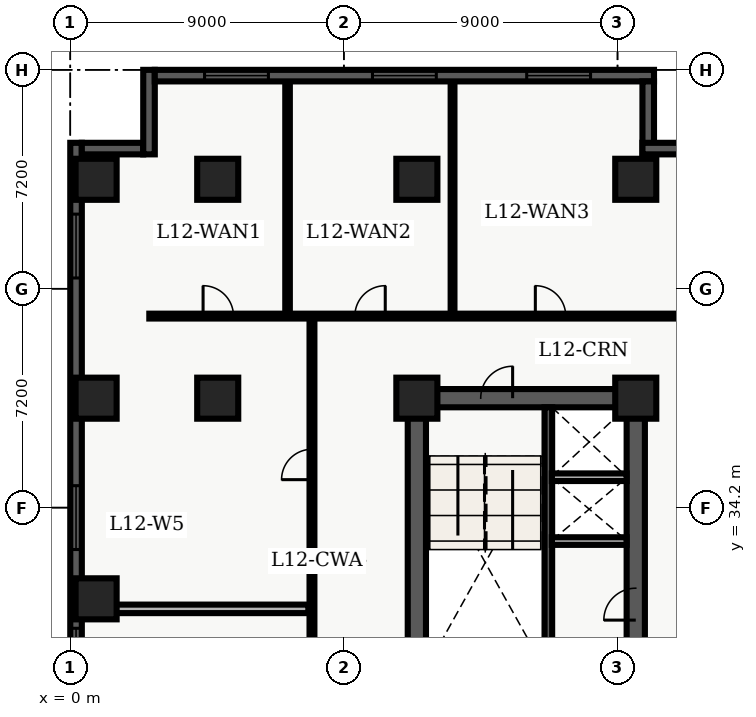
"""IFC4 building model, lengths in metres.
Left out: names, types, materials, properties, quantities, classifications, styles, units other than length and angle.
Written with IfcOpenShell. Run it as: python <this file> out.ifc"""

import sys

from ifc_helpers import new_model, entity, si_unit, converted_unit, direction, frame, origin_with_axes, origin_2d_with_axis, place, context, subcontext, project, spatial, polyline, rectangle, outline, extrude, element, fill, save


model = new_model("IFC4")
c1 = context("Model", 3, precision=1e-05, world=origin_with_axes(), true_north=direction((0.0, 1.0)))
c2 = subcontext(c1, "Body", "Model", "MODEL_VIEW")
j1 = project(units=[si_unit("LENGTHUNIT", "METRE"), converted_unit("PLANEANGLEUNIT", "DEGREE", entity("IfcPlaneAngleMeasure", 0.017), si_unit("PLANEANGLEUNIT", "RADIAN"), dimensions=[0, 0, 0, 0, 0, 0, 0])], contexts=[c1])
p1 = place(None, origin_with_axes())
s1 = spatial("IfcSite", under=j1, at=p1, CompositionType="ELEMENT")
p2 = place(p1, origin_with_axes())
s2 = spatial("IfcBuilding", under=s1, at=p2, CompositionType="ELEMENT")
p3 = place(p2, frame((0.0, 0.0, 52.2), z_axis=(0.0, 0.0, 1.0), x_axis=(1.0, 0.0, 0.0)))
s3 = spatial("IfcBuildingStorey", under=s2, at=p3, CompositionType="ELEMENT", Elevation=52.2)
p4 = place(p3, frame((11.4, 10.8, 0.0), z_axis=(0.0, 0.0, 1.0), x_axis=(0.0, 1.0, 0.0)))
e1 = element("IfcWall", 1, at=p4, inside=s3, PredefinedType="SHEAR", context=c2, shape_type="SweptSolid", body=[
    extrude(outline(polyline([(0.0, -0.3), (27.0, -0.3), (27.0, 0.3), (0.0, 0.3), (0.0, -0.3)])), origin_with_axes(), (0.0, 0.0, 1.0), 3.66),
])
p5 = place(p3, frame((11.4, 37.8, 0.0), z_axis=(0.0, 0.0, 1.0), x_axis=(1.0, 0.0, 0.0)))
e2 = element("IfcWall", 2, at=p5, inside=s3, PredefinedType="SHEAR", context=c2, shape_type="SweptSolid", body=[
    extrude(outline(polyline([(0.0, -0.3), (7.2, -0.3), (7.2, 0.3), (0.0, 0.3), (0.0, -0.3)])), origin_with_axes(), (0.0, 0.0, 1.0), 3.66),
])
p6 = place(p5, frame((2.625, 0.0, 0.0), z_axis=(0.0, 0.0, 1.0), x_axis=(1.0, 0.0, 0.0)))
e3 = element("IfcOpeningElement", 3, at=p6, cuts=e2, PredefinedType="OPENING", context=c2, shape_type="SweptSolid", body=[
    extrude(rectangle(XDim=1.05, YDim=0.62, at=origin_2d_with_axis()), origin_with_axes(), (0.0, 0.0, 1.0), 2.15),
])
p7 = place(p3, frame((18.6, 24.3, 0.0), z_axis=(0.0, 0.0, 1.0), x_axis=(0.0, 1.0, 0.0)))
e4 = element("IfcWall", 4, at=p7, inside=s3, PredefinedType="SHEAR", context=c2, shape_type="SweptSolid", body=[
    extrude(outline(polyline([(0.0, -0.3), (13.5, -0.3), (13.5, 0.3), (0.0, 0.3), (0.0, -0.3)])), origin_with_axes(), (0.0, 0.0, 1.0), 3.66),
])
p8 = place(p7, frame((6.725, 0.0, 0.0), z_axis=(0.0, 0.0, 1.0), x_axis=(1.0, 0.0, 0.0)))
e5 = element("IfcOpeningElement", 5, at=p8, cuts=e4, PredefinedType="OPENING", context=c2, shape_type="SweptSolid", body=[
    extrude(rectangle(XDim=1.05, YDim=0.62, at=origin_2d_with_axis()), origin_with_axes(), (0.0, 0.0, 1.0), 2.15),
])
p9 = place(p3, frame((15.725, 28.9, 0.0), z_axis=(0.0, 0.0, 1.0), x_axis=(0.0, 1.0, 0.0)))
e6 = element("IfcWall", 6, at=p9, inside=s3, PredefinedType="SHEAR", context=c2, shape_type="SweptSolid", body=[
    extrude(outline(polyline([(0.0, -0.125), (8.6, -0.125), (8.6, 0.125), (0.0, 0.125), (0.0, -0.125)])), origin_with_axes(), (0.0, 0.0, 1.0), 3.66),
])
for number, where, z_axis, x_axis in (
    (7, (11.4, 37.8, 0.0), (0.0, 0.0, 1.0), (1.0, 0.0, 0.0)),
    (8, (11.4, 45.0, 0.0), (0.0, 0.0, 1.0), (1.0, 0.0, 0.0)),
    (9, (18.6, 37.8, 0.0), (0.0, 0.0, 1.0), (1.0, 0.0, 0.0)),
    (10, (18.6, 45.0, 0.0), (0.0, 0.0, 1.0), (1.0, 0.0, 0.0)),
    (11, (4.85, 37.8, 0.0), (0.0, 0.0, 1.0), (1.0, 0.0, 0.0)),
    (12, (4.85, 45.0, 0.0), (0.0, 0.0, 1.0), (1.0, 0.0, 0.0)),
    (13, (0.85, 31.2, 0.0), (0.0, 0.0, 1.0), (1.0, 0.0, 0.0)),
    (14, (0.85, 37.8, 0.0), (0.0, 0.0, 1.0), (1.0, 0.0, 0.0)),
    (15, (0.85, 45.0, 0.0), (0.0, 0.0, 1.0), (1.0, 0.0, 0.0)),
):
    element("IfcColumn", number, at=place(p3, frame(where, z_axis=z_axis, x_axis=x_axis)), inside=s3, PredefinedType="COLUMN", context=c2, shape_type="SweptSolid", body=[
        extrude(rectangle(XDim=1.35, YDim=1.35, at=origin_2d_with_axis()), origin_with_axes(), (0.0, 0.0, 1.0), 3.9),
    ])
for number, where, z_axis, x_axis in (
    (16, (15.84, 33.1, 0.0), (0.0, 0.0, 1.0), (1.0, 0.0, 0.0)),
    (17, (15.84, 35.2, 0.0), (0.0, 0.0, 1.0), (1.0, 0.0, 0.0)),
):
    element("IfcWall", number, at=place(p3, frame(where, z_axis=z_axis, x_axis=x_axis)), inside=s3, PredefinedType="SOLIDWALL", context=c2, shape_type="SweptSolid", body=[
        extrude(outline(polyline([(0.0, -0.125), (2.46, -0.125), (2.46, 0.125), (0.0, 0.125), (0.0, -0.125)])), origin_with_axes(), (0.0, 0.0, 1.0), 2.7),
    ])
p10 = place(p3, frame((2.6, 40.5, 0.0), z_axis=(0.0, 0.0, 1.0), x_axis=(1.0, 0.0, 0.0)))
e18 = element("IfcWall", 18, at=p10, inside=s3, PredefinedType="PARTITIONING", context=c2, shape_type="SweptSolid", body=[
    extrude(outline(polyline([(0.0, -0.08), (18.65, -0.08), (18.65, 0.08), (0.0, 0.08), (0.0, -0.08)])), origin_with_axes(), (0.0, 0.0, 1.0), 2.7),
])
p11 = place(p10, frame((2.268, 0.0, 0.0), z_axis=(0.0, 0.0, 1.0), x_axis=(1.0, 0.0, 0.0)))
e19 = element("IfcOpeningElement", 19, at=p11, cuts=e18, PredefinedType="OPENING", context=c2, shape_type="SweptSolid", body=[
    extrude(rectangle(XDim=1.0, YDim=0.18, at=origin_2d_with_axis()), origin_with_axes(), (0.0, 0.0, 1.0), 2.15),
])
p12 = place(p10, frame((7.261, 0.0, 0.0), z_axis=(0.0, 0.0, 1.0), x_axis=(1.0, 0.0, 0.0)))
e20 = element("IfcOpeningElement", 20, at=p12, cuts=e18, PredefinedType="OPENING", context=c2, shape_type="SweptSolid", body=[
    extrude(rectangle(XDim=1.0, YDim=0.18, at=origin_2d_with_axis()), origin_with_axes(), (0.0, 0.0, 1.0), 2.15),
])
p13 = place(p10, frame((13.197, 0.0, 0.0), z_axis=(0.0, 0.0, 1.0), x_axis=(1.0, 0.0, 0.0)))
e21 = element("IfcOpeningElement", 21, at=p13, cuts=e18, PredefinedType="OPENING", context=c2, shape_type="SweptSolid", body=[
    extrude(rectangle(XDim=1.0, YDim=0.18, at=origin_2d_with_axis()), origin_with_axes(), (0.0, 0.0, 1.0), 2.15),
])
p14 = place(p3, frame((7.95, 7.8, 0.0), z_axis=(0.0, 0.0, 1.0), x_axis=(0.0, 1.0, 0.0)))
e22 = element("IfcWall", 22, at=p14, inside=s3, PredefinedType="PARTITIONING", context=c2, shape_type="SweptSolid", body=[
    extrude(outline(polyline([(0.0, -0.08), (32.7, -0.08), (32.7, 0.08), (0.0, 0.08), (0.0, -0.08)])), origin_with_axes(), (0.0, 0.0, 1.0), 2.7),
])
p15 = place(p14, frame((2.288, 0.0, 0.0), z_axis=(0.0, 0.0, 1.0), x_axis=(1.0, 0.0, 0.0)))
e23 = element("IfcOpeningElement", 23, at=p15, cuts=e22, PredefinedType="OPENING", context=c2, shape_type="SweptSolid", body=[
    extrude(rectangle(XDim=1.0, YDim=0.18, at=origin_2d_with_axis()), origin_with_axes(), (0.0, 0.0, 1.0), 2.15),
])
p16 = place(p14, frame((6.971, 0.0, 0.0), z_axis=(0.0, 0.0, 1.0), x_axis=(1.0, 0.0, 0.0)))
e24 = element("IfcOpeningElement", 24, at=p16, cuts=e22, PredefinedType="OPENING", context=c2, shape_type="SweptSolid", body=[
    extrude(rectangle(XDim=1.0, YDim=0.18, at=origin_2d_with_axis()), origin_with_axes(), (0.0, 0.0, 1.0), 2.15),
])
p17 = place(p14, frame((12.598, 0.0, 0.0), z_axis=(0.0, 0.0, 1.0), x_axis=(1.0, 0.0, 0.0)))
e25 = element("IfcOpeningElement", 25, at=p17, cuts=e22, PredefinedType="OPENING", context=c2, shape_type="SweptSolid", body=[
    extrude(rectangle(XDim=1.0, YDim=0.18, at=origin_2d_with_axis()), origin_with_axes(), (0.0, 0.0, 1.0), 2.15),
])
p18 = place(p14, frame((19.386, 0.0, 0.0), z_axis=(0.0, 0.0, 1.0), x_axis=(1.0, 0.0, 0.0)))
e26 = element("IfcOpeningElement", 26, at=p18, cuts=e22, PredefinedType="OPENING", context=c2, shape_type="SweptSolid", body=[
    extrude(rectangle(XDim=1.0, YDim=0.18, at=origin_2d_with_axis()), origin_with_axes(), (0.0, 0.0, 1.0), 2.15),
])
p19 = place(p14, frame((27.82, 0.0, 0.0), z_axis=(0.0, 0.0, 1.0), x_axis=(1.0, 0.0, 0.0)))
e27 = element("IfcOpeningElement", 27, at=p19, cuts=e22, PredefinedType="OPENING", context=c2, shape_type="SweptSolid", body=[
    extrude(rectangle(XDim=1.0, YDim=0.18, at=origin_2d_with_axis()), origin_with_axes(), (0.0, 0.0, 1.0), 2.15),
])
p20 = place(p3, frame((0.375, 30.87, 0.0), z_axis=(0.0, 0.0, 1.0), x_axis=(1.0, 0.0, 0.0)))
e28 = element("IfcWall", 28, at=p20, inside=s3, PredefinedType="PARTITIONING", context=c2, shape_type="SweptSolid", body=[
    extrude(outline(polyline([(0.0, -0.14), (7.455, -0.14), (7.455, 0.14), (0.0, 0.14), (0.0, -0.14)])), origin_with_axes(), (0.0, 0.0, 1.0), 2.7),
])
p21 = place(p3, frame((7.147, 40.6, 0.0), z_axis=(0.0, 0.0, 1.0), x_axis=(0.0, 1.0, 0.0)))
e29 = element("IfcWall", 29, at=p21, inside=s3, PredefinedType="PARTITIONING", context=c2, shape_type="SweptSolid", body=[
    extrude(outline(polyline([(0.0, -0.075), (7.64, -0.075), (7.64, 0.075), (0.0, 0.075), (0.0, -0.075)])), origin_with_axes(), (0.0, 0.0, 1.0), 2.7),
])
p22 = place(p3, frame((12.574, 40.6, 0.0), z_axis=(0.0, 0.0, 1.0), x_axis=(0.0, 1.0, 0.0)))
e30 = element("IfcWall", 30, at=p22, inside=s3, PredefinedType="PARTITIONING", context=c2, shape_type="SweptSolid", body=[
    extrude(outline(polyline([(0.0, -0.062), (7.64, -0.062), (7.64, 0.062), (0.0, 0.062), (0.0, -0.062)])), origin_with_axes(), (0.0, 0.0, 1.0), 2.7),
])
p23 = place(p3, frame((0.19, 2.78, 0.0), z_axis=(0.0, 0.0, 1.0), x_axis=(0.0, 1.0, 0.0)))
e31 = element("IfcWall", 31, at=p23, inside=s3, PredefinedType="SOLIDWALL", context=c2, shape_type="SweptSolid", body=[
    extrude(outline(polyline([(0.0, -0.19), (43.42, -0.19), (43.42, 0.19), (0.0, 0.19), (0.0, -0.19)])), origin_with_axes(), (0.0, 0.0, 1.0), 3.66),
])
p24 = place(p23, frame((2.946, 0.0, 0.45), z_axis=(0.0, 0.0, 1.0), x_axis=(1.0, 0.0, 0.0)))
e32 = element("IfcOpeningElement", 32, at=p24, cuts=e31, PredefinedType="OPENING", context=c2, shape_type="SweptSolid", body=[
    extrude(rectangle(XDim=2.1, YDim=0.4, at=origin_2d_with_axis()), origin_with_axes(), (0.0, 0.0, 1.0), 2.2),
])
p25 = place(p23, frame((12.328, 0.0, 0.45), z_axis=(0.0, 0.0, 1.0), x_axis=(1.0, 0.0, 0.0)))
e33 = element("IfcOpeningElement", 33, at=p25, cuts=e31, PredefinedType="OPENING", context=c2, shape_type="SweptSolid", body=[
    extrude(rectangle(XDim=2.1, YDim=0.4, at=origin_2d_with_axis()), origin_with_axes(), (0.0, 0.0, 1.0), 2.2),
])
p26 = place(p23, frame((17.469, 0.0, 0.45), z_axis=(0.0, 0.0, 1.0), x_axis=(1.0, 0.0, 0.0)))
e34 = element("IfcOpeningElement", 34, at=p26, cuts=e31, PredefinedType="OPENING", context=c2, shape_type="SweptSolid", body=[
    extrude(rectangle(XDim=2.1, YDim=0.4, at=origin_2d_with_axis()), origin_with_axes(), (0.0, 0.0, 1.0), 2.2),
])
p27 = place(p23, frame((22.56, 0.0, 0.45), z_axis=(0.0, 0.0, 1.0), x_axis=(1.0, 0.0, 0.0)))
e35 = element("IfcOpeningElement", 35, at=p27, cuts=e31, PredefinedType="OPENING", context=c2, shape_type="SweptSolid", body=[
    extrude(rectangle(XDim=2.1, YDim=0.4, at=origin_2d_with_axis()), origin_with_axes(), (0.0, 0.0, 1.0), 2.2),
])
p28 = place(p23, frame((26.401, 0.0, 0.45), z_axis=(0.0, 0.0, 1.0), x_axis=(1.0, 0.0, 0.0)))
e36 = element("IfcOpeningElement", 36, at=p28, cuts=e31, PredefinedType="OPENING", context=c2, shape_type="SweptSolid", body=[
    extrude(rectangle(XDim=2.1, YDim=0.4, at=origin_2d_with_axis()), origin_with_axes(), (0.0, 0.0, 1.0), 2.2),
])
p29 = place(p23, frame((31.092, 0.0, 0.45), z_axis=(0.0, 0.0, 1.0), x_axis=(1.0, 0.0, 0.0)))
e37 = element("IfcOpeningElement", 37, at=p29, cuts=e31, PredefinedType="OPENING", context=c2, shape_type="SweptSolid", body=[
    extrude(rectangle(XDim=2.1, YDim=0.4, at=origin_2d_with_axis()), origin_with_axes(), (0.0, 0.0, 1.0), 2.2),
])
p30 = place(p23, frame((40.024, 0.0, 0.45), z_axis=(0.0, 0.0, 1.0), x_axis=(1.0, 0.0, 0.0)))
e38 = element("IfcOpeningElement", 38, at=p30, cuts=e31, PredefinedType="OPENING", context=c2, shape_type="SweptSolid", body=[
    extrude(rectangle(XDim=2.1, YDim=0.4, at=origin_2d_with_axis()), origin_with_axes(), (0.0, 0.0, 1.0), 2.2),
])
p31 = place(p3, frame((0.38, 46.01, 0.0), z_axis=(0.0, 0.0, 1.0), x_axis=(1.0, 0.0, 0.0)))
e39 = element("IfcWall", 39, at=p31, inside=s3, PredefinedType="SOLIDWALL", context=c2, shape_type="SweptSolid", body=[
    extrude(outline(polyline([(0.0, -0.19), (2.02, -0.19), (2.02, 0.19), (0.0, 0.19), (0.0, -0.19)])), origin_with_axes(), (0.0, 0.0, 1.0), 3.66),
])
p32 = place(p3, frame((2.59, 45.82, 0.0), z_axis=(0.0, 0.0, 1.0), x_axis=(0.0, 1.0, 0.0)))
e40 = element("IfcWall", 40, at=p32, inside=s3, PredefinedType="SOLIDWALL", context=c2, shape_type="SweptSolid", body=[
    extrude(outline(polyline([(0.0, -0.19), (2.78, -0.19), (2.78, 0.19), (0.0, 0.19), (0.0, -0.19)])), origin_with_axes(), (0.0, 0.0, 1.0), 3.66),
])
p33 = place(p3, frame((2.78, 48.41, 0.0), z_axis=(0.0, 0.0, 1.0), x_axis=(1.0, 0.0, 0.0)))
e41 = element("IfcWall", 41, at=p33, inside=s3, PredefinedType="SOLIDWALL", context=c2, shape_type="SweptSolid", body=[
    extrude(outline(polyline([(0.0, -0.19), (16.42, -0.19), (16.42, 0.19), (0.0, 0.19), (0.0, -0.19)])), origin_with_axes(), (0.0, 0.0, 1.0), 3.66),
])
p34 = place(p33, frame((2.687, 0.0, 0.45), z_axis=(0.0, 0.0, 1.0), x_axis=(1.0, 0.0, 0.0)))
e42 = element("IfcOpeningElement", 42, at=p34, cuts=e41, PredefinedType="OPENING", context=c2, shape_type="SweptSolid", body=[
    extrude(rectangle(XDim=2.1, YDim=0.4, at=origin_2d_with_axis()), origin_with_axes(), (0.0, 0.0, 1.0), 2.2),
])
p35 = place(p33, frame((8.21, 0.0, 0.45), z_axis=(0.0, 0.0, 1.0), x_axis=(1.0, 0.0, 0.0)))
e43 = element("IfcOpeningElement", 43, at=p35, cuts=e41, PredefinedType="OPENING", context=c2, shape_type="SweptSolid", body=[
    extrude(rectangle(XDim=2.1, YDim=0.4, at=origin_2d_with_axis()), origin_with_axes(), (0.0, 0.0, 1.0), 2.2),
])
p36 = place(p33, frame((13.283, 0.0, 0.45), z_axis=(0.0, 0.0, 1.0), x_axis=(1.0, 0.0, 0.0)))
e44 = element("IfcOpeningElement", 44, at=p36, cuts=e41, PredefinedType="OPENING", context=c2, shape_type="SweptSolid", body=[
    extrude(rectangle(XDim=2.1, YDim=0.4, at=origin_2d_with_axis()), origin_with_axes(), (0.0, 0.0, 1.0), 2.2),
])
p37 = place(p3, frame((19.01, 48.22, 0.0), z_axis=(0.0, 0.0, 1.0), x_axis=(0.0, -1.0, 0.0)))
e45 = element("IfcWall", 45, at=p37, inside=s3, PredefinedType="SOLIDWALL", context=c2, shape_type="SweptSolid", body=[
    extrude(outline(polyline([(0.0, -0.19), (2.56, -0.19), (2.56, 0.19), (0.0, 0.19), (0.0, -0.19)])), origin_with_axes(), (0.0, 0.0, 1.0), 3.66),
])
p38 = place(p3, frame((18.82, 46.01, 0.0), z_axis=(0.0, 0.0, 1.0), x_axis=(1.0, 0.0, 0.0)))
e46 = element("IfcWall", 46, at=p38, inside=s3, PredefinedType="SOLIDWALL", context=c2, shape_type="SweptSolid", body=[
    extrude(outline(polyline([(0.0, -0.19), (2.78, -0.19), (2.78, 0.19), (0.0, 0.19), (0.0, -0.19)])), origin_with_axes(), (0.0, 0.0, 1.0), 3.66),
])
p39 = place(p5, frame((2.625, 0.0, 0.0), z_axis=(0.0, 0.0, 1.0), x_axis=(1.0, 0.0, 0.0)))
e47 = element("IfcDoor", 47, at=p39, inside=s3, OperationType="SINGLE_SWING_RIGHT", PredefinedType="DOOR", context=c2, shape_type="SweptSolid", body=[
    extrude(rectangle(XDim=1.05, YDim=0.09, at=origin_2d_with_axis()), origin_with_axes(), (0.0, 0.0, 1.0), 2.15),
])
fill(e3, e47)
p40 = place(p7, frame((6.725, 0.0, 0.0), z_axis=(0.0, 0.0, 1.0), x_axis=(1.0, 0.0, 0.0)))
e48 = element("IfcDoor", 48, at=p40, inside=s3, OperationType="SINGLE_SWING_LEFT", PredefinedType="DOOR", context=c2, shape_type="SweptSolid", body=[
    extrude(rectangle(XDim=1.05, YDim=0.09, at=origin_2d_with_axis()), origin_with_axes(), (0.0, 0.0, 1.0), 2.15),
])
fill(e5, e48)
p41 = place(p14, frame((27.82, 0.0, 0.0), z_axis=(0.0, 0.0, 1.0), x_axis=(1.0, 0.0, 0.0)))
e49 = element("IfcDoor", 49, at=p41, inside=s3, OperationType="SINGLE_SWING_LEFT", PredefinedType="DOOR", context=c2, shape_type="SweptSolid", body=[
    extrude(rectangle(XDim=1.0, YDim=0.09, at=origin_2d_with_axis()), origin_with_axes(), (0.0, 0.0, 1.0), 2.15),
])
fill(e27, e49)
p42 = place(p10, frame((2.268, 0.0, 0.0), z_axis=(0.0, 0.0, 1.0), x_axis=(1.0, 0.0, 0.0)))
e50 = element("IfcDoor", 50, at=p42, inside=s3, OperationType="SINGLE_SWING_LEFT", PredefinedType="DOOR", context=c2, shape_type="SweptSolid", body=[
    extrude(rectangle(XDim=1.0, YDim=0.09, at=origin_2d_with_axis()), origin_with_axes(), (0.0, 0.0, 1.0), 2.15),
])
fill(e19, e50)
p43 = place(p10, frame((7.261, 0.0, 0.0), z_axis=(0.0, 0.0, 1.0), x_axis=(1.0, 0.0, 0.0)))
e51 = element("IfcDoor", 51, at=p43, inside=s3, OperationType="SINGLE_SWING_RIGHT", PredefinedType="DOOR", context=c2, shape_type="SweptSolid", body=[
    extrude(rectangle(XDim=1.0, YDim=0.09, at=origin_2d_with_axis()), origin_with_axes(), (0.0, 0.0, 1.0), 2.15),
])
fill(e20, e51)
p44 = place(p10, frame((13.197, 0.0, 0.0), z_axis=(0.0, 0.0, 1.0), x_axis=(1.0, 0.0, 0.0)))
e52 = element("IfcDoor", 52, at=p44, inside=s3, OperationType="SINGLE_SWING_LEFT", PredefinedType="DOOR", context=c2, shape_type="SweptSolid", body=[
    extrude(rectangle(XDim=1.0, YDim=0.09, at=origin_2d_with_axis()), origin_with_axes(), (0.0, 0.0, 1.0), 2.15),
])
fill(e21, e52)
p45 = place(p23, frame((26.401, 0.0, 0.45), z_axis=(0.0, 0.0, 1.0), x_axis=(1.0, 0.0, 0.0)))
e53 = element("IfcWindow", 53, at=p45, inside=s3, PredefinedType="WINDOW", context=c2, shape_type="SweptSolid", body=[
    extrude(rectangle(XDim=2.1, YDim=0.09, at=origin_2d_with_axis()), origin_with_axes(), (0.0, 0.0, 1.0), 2.2),
])
fill(e36, e53)
p46 = place(p23, frame((31.092, 0.0, 0.45), z_axis=(0.0, 0.0, 1.0), x_axis=(1.0, 0.0, 0.0)))
e54 = element("IfcWindow", 54, at=p46, inside=s3, PredefinedType="WINDOW", context=c2, shape_type="SweptSolid", body=[
    extrude(rectangle(XDim=2.1, YDim=0.09, at=origin_2d_with_axis()), origin_with_axes(), (0.0, 0.0, 1.0), 2.2),
])
fill(e37, e54)
p47 = place(p23, frame((40.024, 0.0, 0.45), z_axis=(0.0, 0.0, 1.0), x_axis=(1.0, 0.0, 0.0)))
e55 = element("IfcWindow", 55, at=p47, inside=s3, PredefinedType="WINDOW", context=c2, shape_type="SweptSolid", body=[
    extrude(rectangle(XDim=2.1, YDim=0.09, at=origin_2d_with_axis()), origin_with_axes(), (0.0, 0.0, 1.0), 2.2),
])
fill(e38, e55)
p48 = place(p33, frame((2.687, 0.0, 0.45), z_axis=(0.0, 0.0, 1.0), x_axis=(1.0, 0.0, 0.0)))
e56 = element("IfcWindow", 56, at=p48, inside=s3, PredefinedType="WINDOW", context=c2, shape_type="SweptSolid", body=[
    extrude(rectangle(XDim=2.1, YDim=0.09, at=origin_2d_with_axis()), origin_with_axes(), (0.0, 0.0, 1.0), 2.2),
])
fill(e42, e56)
p49 = place(p33, frame((8.21, 0.0, 0.45), z_axis=(0.0, 0.0, 1.0), x_axis=(1.0, 0.0, 0.0)))
e57 = element("IfcWindow", 57, at=p49, inside=s3, PredefinedType="WINDOW", context=c2, shape_type="SweptSolid", body=[
    extrude(rectangle(XDim=2.1, YDim=0.09, at=origin_2d_with_axis()), origin_with_axes(), (0.0, 0.0, 1.0), 2.2),
])
fill(e43, e57)
p50 = place(p33, frame((13.283, 0.0, 0.45), z_axis=(0.0, 0.0, 1.0), x_axis=(1.0, 0.0, 0.0)))
e58 = element("IfcWindow", 58, at=p50, inside=s3, PredefinedType="WINDOW", context=c2, shape_type="SweptSolid", body=[
    extrude(rectangle(XDim=2.1, YDim=0.09, at=origin_2d_with_axis()), origin_with_axes(), (0.0, 0.0, 1.0), 2.2),
])
fill(e44, e58)
save(model, sys.argv[1])
